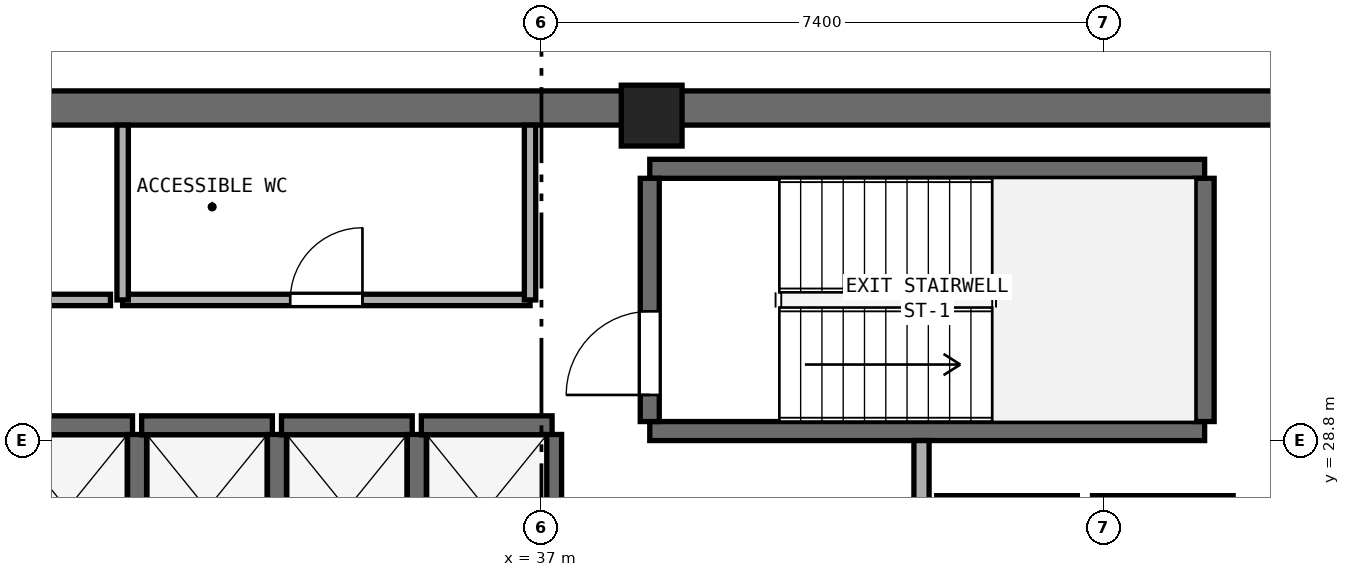
"""IFC4 building model, lengths in metres.
Left out: names, types, materials, properties, quantities, classifications, styles, units other than length and angle.
Written with IfcOpenShell. Run it as: python <this file> out.ifc"""

import sys

from ifc_helpers import new_model, si_unit, direction, frame, frame_2d, origin, origin_2d, place, context, subcontext, project, spatial, rectangle, extrude, element, fill, save


model = new_model("IFC4")
c1 = context("Model", 3, precision=1e-05, world=origin(), true_north=direction((0.0, 1.0)))
c2 = subcontext(c1, "Body", "Model", "MODEL_VIEW")
j1 = project(units=[si_unit("LENGTHUNIT", "METRE"), si_unit("PLANEANGLEUNIT", "RADIAN")], contexts=[c1])
p1 = place(None, origin())
s1 = spatial("IfcSite", under=j1, at=p1, CompositionType="ELEMENT")
p2 = place(p1, origin())
s2 = spatial("IfcBuilding", under=s1, at=p2, CompositionType="ELEMENT")
p3 = place(p2, frame((0.0, 0.0, 274.4)))
s3 = spatial("IfcBuildingStorey", under=s2, at=p3, CompositionType="ELEMENT", Elevation=274.4)
p4 = place(p3, frame((25.4, 33.175, 0.0), z_axis=(0.0, 0.0, 1.0), x_axis=(1.0, 0.0, 0.0)))
e1 = element("IfcWall", 1, at=p4, inside=s3, PredefinedType="SHEAR", context=c2, shape_type="SweptSolid", body=[
    extrude(rectangle(XDim=23.2, YDim=0.45, at=frame_2d((11.6, 0.0))), origin(), (0.0, 0.0, 1.0), 3.54),
])
p5 = place(p3, frame((38.45, 33.075, 0.0), z_axis=(0.0, 0.0, 1.0), x_axis=(1.0, 0.0, 0.0)))
e2 = element("IfcColumn", 2, at=p5, inside=s3, PredefinedType="PILASTER", context=c2, shape_type="SweptSolid", body=[
    extrude(rectangle(XDim=0.8, YDim=0.8, at=origin_2d()), origin(), (0.0, 0.0, 1.0), 3.8),
])
for number, where, z_axis, x_axis in (
    (3, (38.425, 28.925, 0.0), (0.0, 0.0, 1.0), (1.0, 0.0, 0.0)),
    (4, (38.425, 32.375, 0.0), (0.0, 0.0, 1.0), (1.0, 0.0, 0.0)),
):
    element("IfcWall", number, at=place(p3, frame(where, z_axis=z_axis, x_axis=x_axis)), inside=s3, PredefinedType="SHEAR", context=c2, shape_type="SweptSolid", body=[
        extrude(rectangle(XDim=7.3, YDim=0.25, at=frame_2d((3.65, 0.0))), origin(), (0.0, 0.0, 1.0), 3.54),
    ])
p6 = place(p3, frame((38.425, 29.05, 0.0), z_axis=(0.0, 0.0, 1.0), x_axis=(0.0, 1.0, 0.0)))
e5 = element("IfcWall", 5, at=p6, inside=s3, PredefinedType="SHEAR", context=c2, shape_type="SweptSolid", body=[
    extrude(rectangle(XDim=3.2, YDim=0.25, at=frame_2d((1.6, 0.0))), origin(), (0.0, 0.0, 1.0), 3.54),
])
p7 = place(p6, frame((0.35, 0.0, 0.0)))
e6 = element("IfcOpeningElement", 6, at=p7, cuts=e5, PredefinedType="OPENING", context=c2, shape_type="SweptSolid", body=[
    extrude(rectangle(XDim=1.1, YDim=2.15, at=frame_2d((0.55, 1.075))), frame((0.0, 0.135, 0.0), z_axis=(0.0, -1.0, 0.0), x_axis=(1.0, 0.0, 0.0)), (0.0, 0.0, 1.0), 0.27),
])
p8 = place(p3, frame((45.725, 29.05, 0.0), z_axis=(0.0, 0.0, 1.0), x_axis=(0.0, 1.0, 0.0)))
e7 = element("IfcWall", 7, at=p8, inside=s3, PredefinedType="SHEAR", context=c2, shape_type="SweptSolid", body=[
    extrude(rectangle(XDim=3.2, YDim=0.25, at=frame_2d((1.6, 0.0))), origin(), (0.0, 0.0, 1.0), 3.54),
])
p9 = place(p3, frame((29.9, 29.0, 0.0), z_axis=(0.0, 0.0, 1.0), x_axis=(1.0, 0.0, 0.0)))
e8 = element("IfcWall", 8, at=p9, inside=s3, PredefinedType="SHEAR", context=c2, shape_type="SweptSolid", body=[
    extrude(rectangle(XDim=1.72, YDim=0.25, at=frame_2d((0.86, 0.0))), origin(), (0.0, 0.0, 1.0), 3.54),
])
p10 = place(p3, frame((31.68, 26.92, 0.0), z_axis=(0.0, 0.0, 1.0), x_axis=(0.0, 1.0, 0.0)))
e9 = element("IfcWall", 9, at=p10, inside=s3, PredefinedType="SHEAR", context=c2, shape_type="SweptSolid", body=[
    extrude(rectangle(XDim=1.96, YDim=0.25, at=frame_2d((0.98, 0.0))), origin(), (0.0, 0.0, 1.0), 3.54),
])
p11 = place(p3, frame((31.74, 29.0, 0.0), z_axis=(0.0, 0.0, 1.0), x_axis=(1.0, 0.0, 0.0)))
e10 = element("IfcWall", 10, at=p11, inside=s3, PredefinedType="SHEAR", context=c2, shape_type="SweptSolid", body=[
    extrude(rectangle(XDim=1.72, YDim=0.25, at=frame_2d((0.86, 0.0))), origin(), (0.0, 0.0, 1.0), 3.54),
])
p12 = place(p3, frame((33.52, 26.92, 0.0), z_axis=(0.0, 0.0, 1.0), x_axis=(0.0, 1.0, 0.0)))
e11 = element("IfcWall", 11, at=p12, inside=s3, PredefinedType="SHEAR", context=c2, shape_type="SweptSolid", body=[
    extrude(rectangle(XDim=1.96, YDim=0.25, at=frame_2d((0.98, 0.0))), origin(), (0.0, 0.0, 1.0), 3.54),
])
p13 = place(p3, frame((33.58, 29.0, 0.0), z_axis=(0.0, 0.0, 1.0), x_axis=(1.0, 0.0, 0.0)))
e12 = element("IfcWall", 12, at=p13, inside=s3, PredefinedType="SHEAR", context=c2, shape_type="SweptSolid", body=[
    extrude(rectangle(XDim=1.72, YDim=0.25, at=frame_2d((0.86, 0.0))), origin(), (0.0, 0.0, 1.0), 3.54),
])
p14 = place(p3, frame((35.36, 26.92, 0.0), z_axis=(0.0, 0.0, 1.0), x_axis=(0.0, 1.0, 0.0)))
e13 = element("IfcWall", 13, at=p14, inside=s3, PredefinedType="SHEAR", context=c2, shape_type="SweptSolid", body=[
    extrude(rectangle(XDim=1.96, YDim=0.25, at=frame_2d((0.98, 0.0))), origin(), (0.0, 0.0, 1.0), 3.54),
])
p15 = place(p3, frame((35.42, 29.0, 0.0), z_axis=(0.0, 0.0, 1.0), x_axis=(1.0, 0.0, 0.0)))
e14 = element("IfcWall", 14, at=p15, inside=s3, PredefinedType="SHEAR", context=c2, shape_type="SweptSolid", body=[
    extrude(rectangle(XDim=1.72, YDim=0.25, at=frame_2d((0.86, 0.0))), origin(), (0.0, 0.0, 1.0), 3.54),
])
p16 = place(p3, frame((37.14, 26.92, 0.0), z_axis=(0.0, 0.0, 1.0), x_axis=(0.0, 1.0, 0.0)))
e15 = element("IfcWall", 15, at=p16, inside=s3, PredefinedType="SHEAR", context=c2, shape_type="SweptSolid", body=[
    extrude(rectangle(XDim=1.96, YDim=0.25, at=frame_2d((0.98, 0.0))), origin(), (0.0, 0.0, 1.0), 3.54),
])
for number, where, z_axis, x_axis in (
    (16, (42.2, 27.95, 0.0), (0.0, 0.0, 1.0), (1.0, 0.0, 0.0)),
    (17, (44.25, 27.95, 0.0), (0.0, 0.0, 1.0), (1.0, 0.0, 0.0)),
):
    element("IfcWall", number, at=place(p3, frame(where, z_axis=z_axis, x_axis=x_axis)), inside=s3, PredefinedType="SHEAR", context=c2, shape_type="SweptSolid", body=[
        extrude(rectangle(XDim=1.85, YDim=0.25, at=frame_2d((0.925, 0.0))), origin(), (0.0, 0.0, 1.0), 3.54),
    ])
p17 = place(p3, frame((42.0, 22.75, 0.0), z_axis=(0.0, 0.0, 1.0), x_axis=(0.0, 1.0, 0.0)))
e18 = element("IfcWall", 18, at=p17, inside=s3, PredefinedType="SOLIDWALL", context=c2, shape_type="SweptSolid", body=[
    extrude(rectangle(XDim=6.05, YDim=0.2, at=frame_2d((3.025, 0.0))), origin(), (0.0, 0.0, 1.0), 3.54),
])
p18 = place(p17, frame((0.65, 0.0, 0.0)))
e19 = element("IfcOpeningElement", 19, at=p18, cuts=e18, PredefinedType="OPENING", context=c2, shape_type="SweptSolid", body=[
    extrude(rectangle(XDim=1.2, YDim=2.15, at=frame_2d((0.6, 1.075))), frame((0.0, 0.11, 0.0), z_axis=(0.0, -1.0, 0.0), x_axis=(1.0, 0.0, 0.0)), (0.0, 0.0, 1.0), 0.22),
])
p19 = place(p3, frame((25.97, 30.65, 0.0), z_axis=(0.0, 0.0, 1.0), x_axis=(1.0, 0.0, 0.0)))
e20 = element("IfcWall", 20, at=p19, inside=s3, PredefinedType="PARTITIONING", context=c2, shape_type="SweptSolid", body=[
    extrude(rectangle(XDim=5.36, YDim=0.15, at=frame_2d((2.68, 0.0))), origin(), (0.0, 0.0, 1.0), 3.54),
])
p20 = place(p19, frame((2.205, 0.0, 0.0)))
e21 = element("IfcOpeningElement", 21, at=p20, cuts=e20, PredefinedType="OPENING", context=c2, shape_type="SweptSolid", body=[
    extrude(rectangle(XDim=0.95, YDim=2.1, at=frame_2d((0.475, 1.05))), frame((0.0, 0.085, 0.0), z_axis=(0.0, -1.0, 0.0), x_axis=(1.0, 0.0, 0.0)), (0.0, 0.0, 1.0), 0.17),
])
p21 = place(p3, frame((31.49, 30.65, 0.0), z_axis=(0.0, 0.0, 1.0), x_axis=(1.0, 0.0, 0.0)))
e22 = element("IfcWall", 22, at=p21, inside=s3, PredefinedType="PARTITIONING", context=c2, shape_type="SweptSolid", body=[
    extrude(rectangle(XDim=5.36, YDim=0.15, at=frame_2d((2.68, 0.0))), origin(), (0.0, 0.0, 1.0), 3.54),
])
p22 = place(p21, frame((2.205, 0.0, 0.0)))
e23 = element("IfcOpeningElement", 23, at=p22, cuts=e22, PredefinedType="OPENING", context=c2, shape_type="SweptSolid", body=[
    extrude(rectangle(XDim=0.95, YDim=2.1, at=frame_2d((0.475, 1.05))), frame((0.0, 0.085, 0.0), z_axis=(0.0, -1.0, 0.0), x_axis=(1.0, 0.0, 0.0)), (0.0, 0.0, 1.0), 0.17),
])
for number, where, z_axis, x_axis in (
    (24, (31.49, 30.65, 0.0), (0.0, 0.0, 1.0), (0.0, 1.0, 0.0)),
    (25, (36.85, 30.65, 0.0), (0.0, 0.0, 1.0), (0.0, 1.0, 0.0)),
):
    element("IfcWall", number, at=place(p3, frame(where, z_axis=z_axis, x_axis=x_axis)), inside=s3, PredefinedType="PARTITIONING", context=c2, shape_type="SweptSolid", body=[
        extrude(rectangle(XDim=2.3, YDim=0.15, at=frame_2d((1.15, 0.0))), origin(), (0.0, 0.0, 1.0), 3.54),
    ])
p23 = place(p7, origin())
e26 = element("IfcDoor", 26, at=p23, inside=s3, OperationType="SINGLE_SWING_LEFT", PredefinedType="DOOR", context=c2, shape_type="SweptSolid", body=[
    extrude(rectangle(XDim=1.1, YDim=2.15, at=frame_2d((0.55, 1.075))), frame((0.0, 0.025, 0.0), z_axis=(0.0, -1.0, 0.0), x_axis=(1.0, 0.0, 0.0)), (0.0, 0.0, 1.0), 0.05),
])
fill(e6, e26)
p24 = place(p22, origin())
e27 = element("IfcDoor", 27, at=p24, inside=s3, OperationType="SINGLE_SWING_RIGHT", PredefinedType="DOOR", context=c2, shape_type="SweptSolid", body=[
    extrude(rectangle(XDim=0.95, YDim=2.1, at=frame_2d((0.475, 1.05))), frame((0.0, 0.025, 0.0), z_axis=(0.0, -1.0, 0.0), x_axis=(1.0, 0.0, 0.0)), (0.0, 0.0, 1.0), 0.05),
])
fill(e23, e27)
save(model, sys.argv[1])
